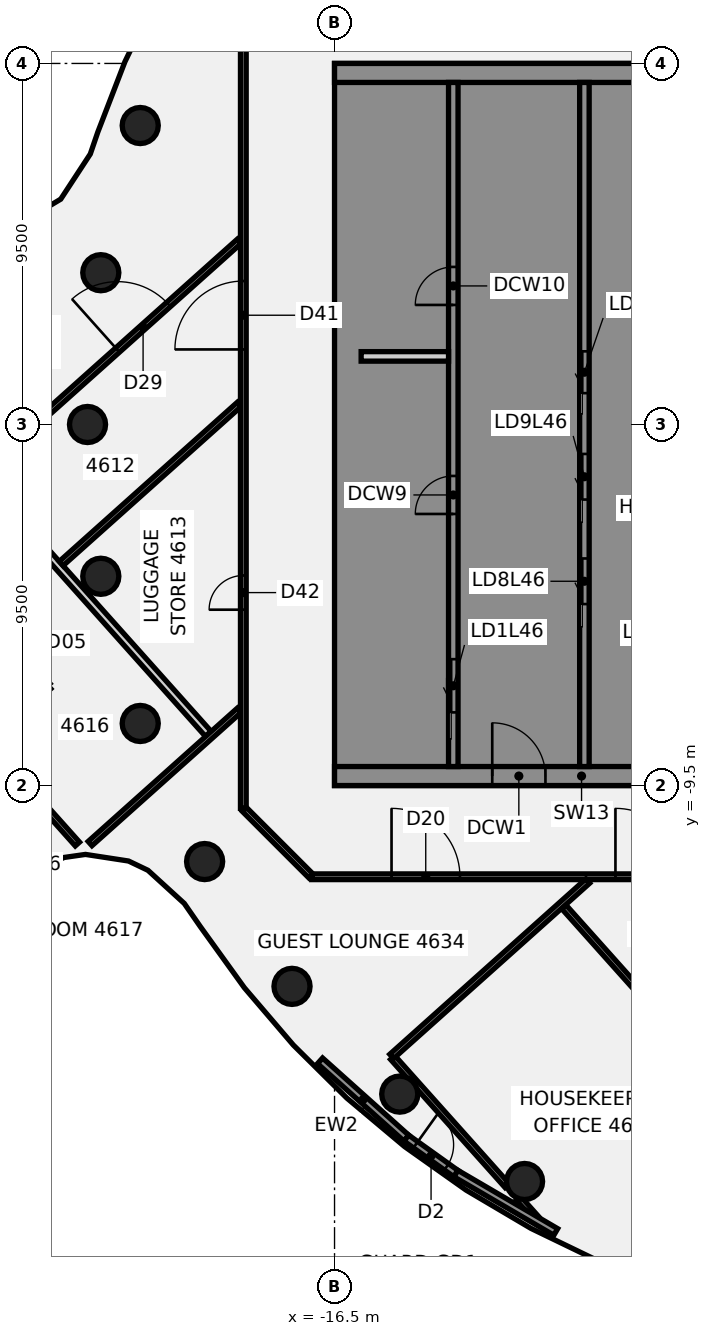
"""IFC4 building model, lengths in metres.
Left out: names, types, materials, properties, quantities, classifications, styles, units other than length and angle.
Written with IfcOpenShell. Run it as: python <this file> out.ifc"""

import sys

from ifc_helpers import new_model, si_unit, direction, frame, frame_2d, origin, origin_2d, place, context, subcontext, project, spatial, polyline, rectangle, circle, outline, extrude, element, fill, save


model = new_model("IFC4")
c1 = context("Model", 3, precision=1e-05, world=origin(), true_north=direction((0.0, 1.0)))
c2 = subcontext(c1, "Body", "Model", "MODEL_VIEW")
j1 = project(units=[si_unit("LENGTHUNIT", "METRE"), si_unit("PLANEANGLEUNIT", "RADIAN")], contexts=[c1])
p1 = place(None, origin())
s1 = spatial("IfcSite", under=j1, at=p1, CompositionType="ELEMENT")
p2 = place(p1, origin())
s2 = spatial("IfcBuilding", under=s1, at=p2, CompositionType="ELEMENT")
p3 = place(p2, frame((0.0, 0.0, 186.1)))
s3 = spatial("IfcBuildingStorey", under=s2, at=p3, CompositionType="ELEMENT", Elevation=186.1)
for number, where, z_axis, x_axis in (
    (1, (-21.613, 7.866, -0.14), (0.0, 0.0, 1.0), (1.0, 0.0, 0.0)),
    (2, (-22.651, 3.994, -0.14), (0.0, 0.0, 1.0), (1.0, 0.0, 0.0)),
    (3, (-23.0, 0.0, -0.14), (0.0, 0.0, 1.0), (1.0, 0.0, 0.0)),
    (4, (-22.651, -3.994, -0.14), (0.0, 0.0, 1.0), (1.0, 0.0, 0.0)),
    (5, (-21.613, -7.866, -0.14), (0.0, 0.0, 1.0), (1.0, 0.0, 0.0)),
    (6, (-19.919, -11.5, -0.14), (0.0, 0.0, 1.0), (1.0, 0.0, 0.0)),
    (7, (-17.619, -14.784, -0.14), (0.0, 0.0, 1.0), (1.0, 0.0, 0.0)),
    (8, (-14.784, -17.619, -0.14), (0.0, 0.0, 1.0), (1.0, 0.0, 0.0)),
    (9, (-11.5, -19.919, -0.14), (0.0, 0.0, 1.0), (1.0, 0.0, 0.0)),
):
    element("IfcColumn", number, at=place(p3, frame(where, z_axis=z_axis, x_axis=x_axis)), inside=s3, PredefinedType="COLUMN", context=c2, shape_type="SweptSolid", body=[
        extrude(circle(Radius=0.475, at=origin_2d()), origin(), (0.0, 0.0, 1.0), 3.6),
    ])
p4 = place(p3, frame((-24.523, -9.632, -0.139), z_axis=(0.048801348764, -0.012268116842, 0.99873315839), x_axis=(-0.66598299183, 0.744800990849, 0.041690989716)))
e10 = element("IfcColumn", 10, at=p4, inside=s3, PredefinedType="COLUMN", context=c2, shape_type="SweptSolid", body=[
    extrude(rectangle(XDim=0.9, YDim=0.9, at=origin_2d()), origin(), (0.0, 0.0, 1.0), 3.602),
])
p5 = place(p3, frame((-29.297, 2.462, 0.0), z_axis=(0.0, 0.0, 1.0), x_axis=(0.666350075951, -0.745639038866, 0.0)))
e11 = element("IfcWall", 11, at=p5, inside=s3, PredefinedType="PARTITIONING", context=c2, shape_type="SweptSolid", body=[
    extrude(rectangle(XDim=14.219, YDim=0.2, at=frame_2d((7.11, 0.0))), origin(), (0.0, 0.0, 1.0), 2.864),
])
p6 = place(p5, frame((5.799, 0.0, 0.0)))
e12 = element("IfcOpeningElement", 12, at=p6, cuts=e11, PredefinedType="OPENING", context=c2, shape_type="SweptSolid", body=[
    extrude(rectangle(XDim=1.4, YDim=2.1, at=frame_2d((0.7, 1.05))), frame((0.0, 0.11, 0.0), z_axis=(0.0, -1.0, 0.0), x_axis=(1.0, 0.0, 0.0)), (0.0, 0.0, 1.0), 0.22),
])
p7 = place(p3, frame((-24.117, -10.087, 0.0), z_axis=(0.0, 0.0, 1.0), x_axis=(0.666380789651, -0.745611590028, 0.0)))
e13 = element("IfcWall", 13, at=p7, inside=s3, PredefinedType="PARTITIONING", context=c2, shape_type="SweptSolid", body=[
    extrude(rectangle(XDim=1.276, YDim=0.15, at=frame_2d((0.638, 0.0))), origin(), (0.0, 0.0, 1.0), 2.864),
])
p8 = place(p3, frame((-14.969, -16.657, 0.0), z_axis=(0.0, 0.0, 1.0), x_axis=(0.666348223985, -0.745640693895, 0.0)))
e14 = element("IfcWall", 14, at=p8, inside=s3, PredefinedType="PARTITIONING", context=c2, shape_type="SweptSolid", body=[
    extrude(rectangle(XDim=4.523, YDim=0.15, at=frame_2d((2.261, 0.0))), origin(), (0.0, 0.0, 1.0), 2.864),
])
p9 = place(p3, frame((-11.659, -20.361, 0.0), z_axis=(0.0, 0.0, 1.0), x_axis=(0.666420937465, -0.74557570649, 0.0)))
e15 = element("IfcWall", 15, at=p9, inside=s3, PredefinedType="PARTITIONING", context=c2, shape_type="SweptSolid", body=[
    extrude(rectangle(XDim=0.706, YDim=0.15, at=frame_2d((0.353, 0.0))), origin(), (0.0, 0.0, 1.0), 2.864),
])
p10 = place(p3, frame((-10.47, -12.688, 0.0), z_axis=(0.0, 0.0, 1.0), x_axis=(0.666418267017, -0.745578093419, 0.0)))
e16 = element("IfcWall", 16, at=p10, inside=s3, PredefinedType="PARTITIONING", context=c2, shape_type="SweptSolid", body=[
    extrude(rectangle(XDim=15.22, YDim=0.15, at=frame_2d((7.61, 0.0))), origin(), (0.0, 0.0, 1.0), 2.864),
])
p11 = place(p10, frame((9.37, 0.0, 0.0)))
e17 = element("IfcOpeningElement", 17, at=p11, cuts=e16, PredefinedType="OPENING", context=c2, shape_type="SweptSolid", body=[
    extrude(rectangle(XDim=0.9, YDim=2.1, at=frame_2d((0.45, 1.05))), frame((0.0, 0.085, 0.0), z_axis=(0.0, -1.0, 0.0), x_axis=(1.0, 0.0, 0.0)), (0.0, 0.0, 1.0), 0.17),
])
p12 = place(p3, frame((-18.872, -10.128, 0.0), z_axis=(0.0, 0.0, 1.0), x_axis=(0.707106781187, -0.707106781187, 0.0)))
e18 = element("IfcWall", 18, at=p12, inside=s3, PredefinedType="PARTITIONING", context=c2, shape_type="SweptSolid", body=[
    extrude(rectangle(XDim=2.465, YDim=0.15, at=frame_2d((1.232, 0.0))), origin(), (0.0, 0.0, 1.0), 2.864),
])
p13 = place(p3, frame((-17.1, -11.9, 0.0), z_axis=(0.0, 0.0, 1.0), x_axis=(1.0, 0.0, 0.0)))
e19 = element("IfcWall", 19, at=p13, inside=s3, PredefinedType="PARTITIONING", context=c2, shape_type="SweptSolid", body=[
    extrude(rectangle(XDim=34.165, YDim=0.15, at=frame_2d((17.083, 0.0))), origin(), (0.0, 0.0, 1.0), 2.864),
])
p14 = place(p13, frame((7.992, 0.0, 0.0)))
e20 = element("IfcOpeningElement", 20, at=p14, cuts=e19, PredefinedType="OPENING", context=c2, shape_type="SweptSolid", body=[
    extrude(rectangle(XDim=1.8, YDim=2.1, at=frame_2d((0.9, 1.05))), frame((0.0, 0.085, 0.0), z_axis=(0.0, -1.0, 0.0), x_axis=(1.0, 0.0, 0.0)), (0.0, 0.0, 1.0), 0.17),
])
p15 = place(p13, frame((2.1, 0.0, 0.0)))
e21 = element("IfcOpeningElement", 21, at=p15, cuts=e19, PredefinedType="OPENING", context=c2, shape_type="SweptSolid", body=[
    extrude(rectangle(XDim=1.8, YDim=2.1, at=frame_2d((0.9, 1.05))), frame((0.0, 0.085, 0.0), z_axis=(0.0, -1.0, 0.0), x_axis=(1.0, 0.0, 0.0)), (0.0, 0.0, 1.0), 0.17),
])
p16 = place(p13, frame((25.316, 0.0, 0.0)))
e22 = element("IfcOpeningElement", 22, at=p16, cuts=e19, PredefinedType="OPENING", context=c2, shape_type="SweptSolid", body=[
    extrude(rectangle(XDim=1.8, YDim=2.1, at=frame_2d((0.9, 1.05))), frame((0.0, 0.085, 0.0), z_axis=(0.0, -1.0, 0.0), x_axis=(1.0, 0.0, 0.0)), (0.0, 0.0, 1.0), 0.17),
])
p17 = place(p3, frame((-25.824, -1.273, 0.0), z_axis=(0.0, 0.0, 1.0), x_axis=(0.745520592409, 0.666482592641, 0.0)))
e23 = element("IfcWall", 23, at=p17, inside=s3, PredefinedType="PARTITIONING", context=c2, shape_type="SweptSolid", body=[
    extrude(rectangle(XDim=9.143, YDim=0.15, at=frame_2d((4.572, 0.0))), origin(), (0.0, 0.0, 1.0), 2.864),
])
p18 = place(p17, frame((4.85, 0.0, 0.0)))
e24 = element("IfcOpeningElement", 24, at=p18, cuts=e23, PredefinedType="OPENING", context=c2, shape_type="SweptSolid", body=[
    extrude(rectangle(XDim=1.8, YDim=2.1, at=frame_2d((0.9, 1.05))), frame((0.0, 0.085, 0.0), z_axis=(0.0, -1.0, 0.0), x_axis=(1.0, 0.0, 0.0)), (0.0, 0.0, 1.0), 0.17),
])
p19 = place(p3, frame((-23.692, -3.658, 0.0), z_axis=(0.0, 0.0, 1.0), x_axis=(0.745594888816, 0.666399476119, 0.0)))
e25 = element("IfcWall", 25, at=p19, inside=s3, PredefinedType="PARTITIONING", context=c2, shape_type="SweptSolid", body=[
    extrude(rectangle(XDim=6.283, YDim=0.15, at=frame_2d((3.141, 0.0))), origin(), (0.0, 0.0, 1.0), 2.864),
])
p20 = place(p3, frame((-22.932, -11.027, 0.0), z_axis=(0.0, 0.0, 1.0), x_axis=(0.745633052356, 0.666356774735, 0.0)))
e26 = element("IfcWall", 26, at=p20, inside=s3, PredefinedType="PARTITIONING", context=c2, shape_type="SweptSolid", body=[
    extrude(rectangle(XDim=5.263, YDim=0.15, at=frame_2d((2.632, 0.0))), origin(), (0.0, 0.0, 1.0), 2.864),
])
p21 = place(p3, frame((-14.996, -16.627, 0.0), z_axis=(0.0, 0.0, 1.0), x_axis=(0.74550136181, 0.666504103167, 0.0)))
e27 = element("IfcWall", 27, at=p21, inside=s3, PredefinedType="PARTITIONING", context=c2, shape_type="SweptSolid", body=[
    extrude(rectangle(XDim=6.923, YDim=0.15, at=frame_2d((3.461, 0.0))), origin(), (0.0, 0.0, 1.0), 2.864),
])
p22 = place(p3, frame((-18.9, -10.1, 0.0), z_axis=(0.0, 0.0, 1.0), x_axis=(0.0, 1.0, 0.0)))
e28 = element("IfcWall", 28, at=p22, inside=s3, PredefinedType="PARTITIONING", context=c2, shape_type="SweptSolid", body=[
    extrude(rectangle(XDim=20.2, YDim=0.15, at=frame_2d((10.1, 0.0))), origin(), (0.0, 0.0, 1.0), 2.864),
])
p23 = place(p22, frame((12.075, 0.0, 0.0)))
e29 = element("IfcOpeningElement", 29, at=p23, cuts=e28, PredefinedType="OPENING", context=c2, shape_type="SweptSolid", body=[
    extrude(rectangle(XDim=1.8, YDim=2.1, at=frame_2d((0.9, 1.05))), frame((0.0, 0.085, 0.0), z_axis=(0.0, -1.0, 0.0), x_axis=(1.0, 0.0, 0.0)), (0.0, 0.0, 1.0), 0.17),
])
p24 = place(p22, frame((5.227, 0.0, 0.0)))
e30 = element("IfcOpeningElement", 30, at=p24, cuts=e28, PredefinedType="OPENING", context=c2, shape_type="SweptSolid", body=[
    extrude(rectangle(XDim=0.9, YDim=2.1, at=frame_2d((0.45, 1.05))), frame((0.0, 0.085, 0.0), z_axis=(0.0, -1.0, 0.0), x_axis=(1.0, 0.0, 0.0)), (0.0, 0.0, 1.0), 0.17),
])
p25 = place(p3, frame((-16.881, -16.743, 0.0), z_axis=(0.0, 0.0, 1.0), x_axis=(0.744845286736, -0.667237213311, 0.0)))
e31 = element("IfcWall", 31, at=p25, inside=s3, PredefinedType="SOLIDWALL", context=c2, shape_type="SweptSolid", body=[
    extrude(rectangle(XDim=3.048, YDim=0.2, at=frame_2d((1.524, 0.0))), origin(), (0.0, 0.0, 1.0), 3.46),
])
p26 = place(p3, frame((-13.309, -19.708, 0.0), z_axis=(0.0, 0.0, 1.0), x_axis=(0.863304849932, -0.504682807399, 0.0)))
e32 = element("IfcWall", 32, at=p26, inside=s3, PredefinedType="SOLIDWALL", context=c2, shape_type="SweptSolid", body=[
    extrude(rectangle(XDim=3.047, YDim=0.2, at=frame_2d((1.523, 0.0))), origin(), (0.0, 0.0, 1.0), 3.46),
])
p27 = place(p3, frame((-14.611, -18.777, 0.0), z_axis=(0.0, 0.0, 1.0), x_axis=(0.81345495277, -0.58162792214, 0.0)))
e33 = element("IfcWall", 33, at=p27, inside=s3, PredefinedType="SOLIDWALL", context=c2, shape_type="SweptSolid", body=[
    extrude(rectangle(XDim=1.6, YDim=0.2, at=frame_2d((0.8, 0.0))), origin(), (0.0, 0.0, 1.0), 3.46),
])
p28 = place(p27, frame((0.3, 0.0, 0.0)))
e34 = element("IfcOpeningElement", 34, at=p28, cuts=e33, PredefinedType="OPENING", context=c2, shape_type="SweptSolid", body=[
    extrude(rectangle(XDim=1.0, YDim=2.4, at=frame_2d((0.5, 1.2))), frame((0.0, 0.11, 0.0), z_axis=(0.0, -1.0, 0.0), x_axis=(1.0, 0.0, 0.0)), (0.0, 0.0, 1.0), 0.22),
])
p29 = place(p3, frame((-16.5, -9.25, 0.0), z_axis=(0.0, 0.0, 1.0), x_axis=(1.0, 0.0, 0.0)))
e35 = element("IfcWall", 35, at=p29, inside=s3, PredefinedType="SHEAR", context=c2, shape_type="SweptSolid", body=[
    extrude(rectangle(XDim=13.0, YDim=0.5, at=frame_2d((6.5, 0.0))), origin(), (0.0, 0.0, 1.0), 3.46),
])
p30 = place(p29, frame((4.15, 0.0, 0.0)))
e36 = element("IfcOpeningElement", 36, at=p30, cuts=e35, PredefinedType="OPENING", context=c2, shape_type="SweptSolid", body=[
    extrude(rectangle(XDim=1.4, YDim=2.1, at=frame_2d((0.7, 1.05))), frame((0.0, 0.26, 0.0), z_axis=(0.0, -1.0, 0.0), x_axis=(1.0, 0.0, 0.0)), (0.0, 0.0, 1.0), 0.52),
])
p31 = place(p29, frame((10.125, 0.0, 0.0)))
e37 = element("IfcOpeningElement", 37, at=p31, cuts=e35, PredefinedType="OPENING", context=c2, shape_type="SweptSolid", body=[
    extrude(rectangle(XDim=1.4, YDim=2.1, at=frame_2d((0.7, 1.05))), frame((0.0, 0.26, 0.0), z_axis=(0.0, -1.0, 0.0), x_axis=(1.0, 0.0, 0.0)), (0.0, 0.0, 1.0), 0.52),
])
p32 = place(p3, origin())
e38 = element("IfcWall", 38, at=p32, inside=s3, PredefinedType="SHEAR", context=c2, shape_type="SweptSolid", body=[
    extrude(outline(polyline([(-13.5, -8.125), (-16.0, -8.125), (-16.0, -5.625), (-13.5, -5.625), (-13.5, -5.375), (-16.0, -5.375), (-16.0, 5.375), (-13.5, 5.375), (-13.5, 5.625), (-16.0, 5.625), (-16.0, 8.125), (-13.5, 8.125), (-13.5, 9.0), (-16.0, 9.0), (-16.5, 9.0), (-16.5, -9.0), (-16.0, -9.0), (-13.5, -9.0), (-13.5, -8.125)])), origin(), (0.0, 0.0, 1.0), 3.46),
])
p33 = place(p3, frame((-16.5, 9.25, 0.0), z_axis=(0.0, 0.0, 1.0), x_axis=(1.0, 0.0, 0.0)))
e39 = element("IfcWall", 39, at=p33, inside=s3, PredefinedType="SHEAR", context=c2, shape_type="SweptSolid", body=[
    extrude(rectangle(XDim=13.0, YDim=0.5, at=frame_2d((6.5, 0.0))), origin(), (0.0, 0.0, 1.0), 3.46),
])
p34 = place(p3, origin())
e40 = element("IfcWall", 40, at=p34, inside=s3, PredefinedType="SHEAR", context=c2, shape_type="SweptSolid", body=[
    extrude(outline(polyline([(-9.8, -5.375), (-9.8, -5.625), (-7.5, -5.625), (-7.25, -5.625), (-7.25, 9.0), (-7.5, 9.0), (-9.8, 9.0), (-9.8, 8.125), (-7.5, 8.125), (-7.5, 5.625), (-9.8, 5.625), (-9.8, 5.375), (-7.5, 5.375), (-7.5, 2.875), (-9.8, 2.875), (-9.8, 2.625), (-7.5, 2.625), (-7.5, 0.125), (-9.8, 0.125), (-9.8, -0.125), (-7.5, -0.125), (-7.5, -2.625), (-9.8, -2.625), (-9.8, -2.875), (-7.5, -2.875), (-7.5, -5.375), (-9.8, -5.375)])), origin(), (0.0, 0.0, 1.0), 3.46),
])
p35 = place(p3, origin())
e41 = element("IfcWall", 41, at=p35, inside=s3, PredefinedType="SHEAR", context=c2, shape_type="SweptSolid", body=[
    extrude(outline(polyline([(-7.5, -8.125), (-9.55, -8.125), (-9.55, -5.625), (-9.8, -5.625), (-9.8, -8.125), (-9.8, -9.0), (-7.5, -9.0), (-7.5, -8.125)])), origin(), (0.0, 0.0, 1.0), 3.46),
])
p36 = place(p3, frame((-13.375, -9.0, 0.0), z_axis=(0.0, 0.0, 1.0), x_axis=(0.0, 1.0, 0.0)))
e42 = element("IfcWall", 42, at=p36, inside=s3, PredefinedType="SHEAR", context=c2, shape_type="SweptSolid", body=[
    extrude(rectangle(XDim=18.0, YDim=0.25, at=frame_2d((9.0, 0.0))), origin(), (0.0, 0.0, 1.0), 3.46),
])
p37 = place(p36, frame((1.425, 0.0, 0.0)))
e43 = element("IfcOpeningElement", 43, at=p37, cuts=e42, PredefinedType="OPENING", context=c2, shape_type="SweptSolid", body=[
    extrude(rectangle(XDim=1.4, YDim=2.1, at=frame_2d((0.7, 1.05))), frame((0.0, 0.135, 0.0), z_axis=(0.0, -1.0, 0.0), x_axis=(1.0, 0.0, 0.0)), (0.0, 0.0, 1.0), 0.27),
])
p38 = place(p36, frame((6.646, 0.0, 0.0)))
e44 = element("IfcOpeningElement", 44, at=p38, cuts=e42, PredefinedType="OPENING", context=c2, shape_type="SweptSolid", body=[
    extrude(rectangle(XDim=1.0, YDim=2.1, at=frame_2d((0.5, 1.05))), frame((0.0, 0.135, 0.0), z_axis=(0.0, -1.0, 0.0), x_axis=(1.0, 0.0, 0.0)), (0.0, 0.0, 1.0), 0.27),
])
p39 = place(p36, frame((12.146, 0.0, 0.0)))
e45 = element("IfcOpeningElement", 45, at=p39, cuts=e42, PredefinedType="OPENING", context=c2, shape_type="SweptSolid", body=[
    extrude(rectangle(XDim=1.0, YDim=2.1, at=frame_2d((0.5, 1.05))), frame((0.0, 0.135, 0.0), z_axis=(0.0, -1.0, 0.0), x_axis=(1.0, 0.0, 0.0)), (0.0, 0.0, 1.0), 0.27),
])
p40 = place(p3, frame((-9.925, -9.0, 0.0), z_axis=(0.0, 0.0, 1.0), x_axis=(0.0, 1.0, 0.0)))
e46 = element("IfcWall", 46, at=p40, inside=s3, PredefinedType="SHEAR", context=c2, shape_type="SweptSolid", body=[
    extrude(rectangle(XDim=18.0, YDim=0.25, at=frame_2d((9.0, 0.0))), origin(), (0.0, 0.0, 1.0), 3.46),
])
p41 = place(p40, frame((4.275, 0.0, 0.0)))
e47 = element("IfcOpeningElement", 47, at=p41, cuts=e46, PredefinedType="OPENING", context=c2, shape_type="SweptSolid", body=[
    extrude(rectangle(XDim=1.2, YDim=2.1, at=frame_2d((0.6, 1.05))), frame((0.0, 0.135, 0.0), z_axis=(0.0, -1.0, 0.0), x_axis=(1.0, 0.0, 0.0)), (0.0, 0.0, 1.0), 0.27),
])
p42 = place(p40, frame((7.025, 0.0, 0.0)))
e48 = element("IfcOpeningElement", 48, at=p42, cuts=e46, PredefinedType="OPENING", context=c2, shape_type="SweptSolid", body=[
    extrude(rectangle(XDim=1.2, YDim=2.1, at=frame_2d((0.6, 1.05))), frame((0.0, 0.135, 0.0), z_axis=(0.0, -1.0, 0.0), x_axis=(1.0, 0.0, 0.0)), (0.0, 0.0, 1.0), 0.27),
])
p43 = place(p40, frame((9.825, 0.0, 0.0)))
e49 = element("IfcOpeningElement", 49, at=p43, cuts=e46, PredefinedType="OPENING", context=c2, shape_type="SweptSolid", body=[
    extrude(rectangle(XDim=1.1, YDim=2.1, at=frame_2d((0.55, 1.05))), frame((0.0, 0.135, 0.0), z_axis=(0.0, -1.0, 0.0), x_axis=(1.0, 0.0, 0.0)), (0.0, 0.0, 1.0), 0.27),
])
p44 = place(p3, frame((-15.8, 1.792, 0.0), z_axis=(0.0, 0.0, 1.0), x_axis=(1.0, 0.0, 0.0)))
e50 = element("IfcWall", 50, at=p44, inside=s3, PredefinedType="PARTITIONING", context=c2, shape_type="SweptSolid", body=[
    extrude(rectangle(XDim=2.3, YDim=0.25, at=frame_2d((1.15, 0.0))), origin(), (0.0, 0.0, 1.0), 3.46),
])
p45 = place(p14, origin())
e51 = element("IfcDoor", 51, at=p45, inside=s3, OperationType="DOUBLE_DOOR_SINGLE_SWING", PredefinedType="DOOR", context=c2, shape_type="SweptSolid", body=[
    extrude(rectangle(XDim=1.8, YDim=2.1, at=frame_2d((0.9, 1.05))), frame((0.0, 0.025, 0.0), z_axis=(0.0, -1.0, 0.0), x_axis=(1.0, 0.0, 0.0)), (0.0, 0.0, 1.0), 0.05),
])
fill(e20, e51)
p46 = place(p15, frame((1.8, 0.0, 0.0), z_axis=(0.0, 0.0, 1.0), x_axis=(-1.0, 0.0, 0.0)))
e52 = element("IfcDoor", 52, at=p46, inside=s3, OperationType="DOUBLE_DOOR_SINGLE_SWING", PredefinedType="DOOR", context=c2, shape_type="SweptSolid", body=[
    extrude(rectangle(XDim=1.8, YDim=2.1, at=frame_2d((0.9, 1.05))), frame((0.0, 0.025, 0.0), z_axis=(0.0, -1.0, 0.0), x_axis=(1.0, 0.0, 0.0)), (0.0, 0.0, 1.0), 0.05),
])
fill(e21, e52)
p47 = place(p18, origin())
e53 = element("IfcDoor", 53, at=p47, inside=s3, OperationType="DOUBLE_DOOR_SINGLE_SWING", PredefinedType="DOOR", context=c2, shape_type="SweptSolid", body=[
    extrude(rectangle(XDim=1.8, YDim=2.1, at=frame_2d((0.9, 1.05))), frame((0.0, 0.025, 0.0), z_axis=(0.0, -1.0, 0.0), x_axis=(1.0, 0.0, 0.0)), (0.0, 0.0, 1.0), 0.05),
])
fill(e24, e53)
p48 = place(p23, frame((1.8, 0.0, 0.0), z_axis=(0.0, 0.0, 1.0), x_axis=(-1.0, 0.0, 0.0)))
e54 = element("IfcDoor", 54, at=p48, inside=s3, OperationType="DOUBLE_DOOR_SINGLE_SWING", PredefinedType="DOOR", context=c2, shape_type="SweptSolid", body=[
    extrude(rectangle(XDim=1.8, YDim=2.1, at=frame_2d((0.9, 1.05))), frame((0.0, 0.025, 0.0), z_axis=(0.0, -1.0, 0.0), x_axis=(1.0, 0.0, 0.0)), (0.0, 0.0, 1.0), 0.05),
])
fill(e29, e54)
p49 = place(p24, origin())
e55 = element("IfcDoor", 55, at=p49, inside=s3, OperationType="SINGLE_SWING_RIGHT", PredefinedType="DOOR", context=c2, shape_type="SweptSolid", body=[
    extrude(rectangle(XDim=0.9, YDim=2.1, at=frame_2d((0.45, 1.05))), frame((0.0, 0.025, 0.0), z_axis=(0.0, -1.0, 0.0), x_axis=(1.0, 0.0, 0.0)), (0.0, 0.0, 1.0), 0.05),
])
fill(e30, e55)
p50 = place(p28, origin())
e56 = element("IfcDoor", 56, at=p50, inside=s3, OperationType="SINGLE_SWING_LEFT", PredefinedType="DOOR", context=c2, shape_type="SweptSolid", body=[
    extrude(rectangle(XDim=1.0, YDim=2.4, at=frame_2d((0.5, 1.2))), frame((0.0, 0.025, 0.0), z_axis=(0.0, -1.0, 0.0), x_axis=(1.0, 0.0, 0.0)), (0.0, 0.0, 1.0), 0.05),
])
fill(e34, e56)
p51 = place(p30, origin())
e57 = element("IfcDoor", 57, at=p51, inside=s3, OperationType="SINGLE_SWING_LEFT", PredefinedType="DOOR", context=c2, shape_type="SweptSolid", body=[
    extrude(rectangle(XDim=1.4, YDim=2.1, at=frame_2d((0.7, 1.05))), frame((0.0, 0.025, 0.0), z_axis=(0.0, -1.0, 0.0), x_axis=(1.0, 0.0, 0.0)), (0.0, 0.0, 1.0), 0.05),
])
fill(e36, e57)
p52 = place(p37, origin())
e58 = element("IfcDoor", 58, at=p52, inside=s3, OperationType="SLIDING_TO_LEFT", PredefinedType="DOOR", context=c2, shape_type="SweptSolid", body=[
    extrude(rectangle(XDim=1.4, YDim=2.1, at=frame_2d((0.7, 1.05))), frame((0.0, 0.025, 0.0), z_axis=(0.0, -1.0, 0.0), x_axis=(1.0, 0.0, 0.0)), (0.0, 0.0, 1.0), 0.05),
])
fill(e43, e58)
p53 = place(p41, origin())
e59 = element("IfcDoor", 59, at=p53, inside=s3, OperationType="SLIDING_TO_LEFT", PredefinedType="DOOR", context=c2, shape_type="SweptSolid", body=[
    extrude(rectangle(XDim=1.2, YDim=2.1, at=frame_2d((0.6, 1.05))), frame((0.0, 0.025, 0.0), z_axis=(0.0, -1.0, 0.0), x_axis=(1.0, 0.0, 0.0)), (0.0, 0.0, 1.0), 0.05),
])
fill(e47, e59)
p54 = place(p42, origin())
e60 = element("IfcDoor", 60, at=p54, inside=s3, OperationType="SLIDING_TO_LEFT", PredefinedType="DOOR", context=c2, shape_type="SweptSolid", body=[
    extrude(rectangle(XDim=1.2, YDim=2.1, at=frame_2d((0.6, 1.05))), frame((0.0, 0.025, 0.0), z_axis=(0.0, -1.0, 0.0), x_axis=(1.0, 0.0, 0.0)), (0.0, 0.0, 1.0), 0.05),
])
fill(e48, e60)
p55 = place(p43, origin())
e61 = element("IfcDoor", 61, at=p55, inside=s3, OperationType="SLIDING_TO_LEFT", PredefinedType="DOOR", context=c2, shape_type="SweptSolid", body=[
    extrude(rectangle(XDim=1.1, YDim=2.1, at=frame_2d((0.55, 1.05))), frame((0.0, 0.025, 0.0), z_axis=(0.0, -1.0, 0.0), x_axis=(1.0, 0.0, 0.0)), (0.0, 0.0, 1.0), 0.05),
])
fill(e49, e61)
p56 = place(p38, origin())
e62 = element("IfcDoor", 62, at=p56, inside=s3, OperationType="SINGLE_SWING_LEFT", PredefinedType="DOOR", context=c2, shape_type="SweptSolid", body=[
    extrude(rectangle(XDim=1.0, YDim=2.1, at=frame_2d((0.5, 1.05))), frame((0.0, 0.025, 0.0), z_axis=(0.0, -1.0, 0.0), x_axis=(1.0, 0.0, 0.0)), (0.0, 0.0, 1.0), 0.05),
])
fill(e44, e62)
p57 = place(p39, origin())
e63 = element("IfcDoor", 63, at=p57, inside=s3, OperationType="SINGLE_SWING_LEFT", PredefinedType="DOOR", context=c2, shape_type="SweptSolid", body=[
    extrude(rectangle(XDim=1.0, YDim=2.1, at=frame_2d((0.5, 1.05))), frame((0.0, 0.025, 0.0), z_axis=(0.0, -1.0, 0.0), x_axis=(1.0, 0.0, 0.0)), (0.0, 0.0, 1.0), 0.05),
])
fill(e45, e63)
save(model, sys.argv[1])
